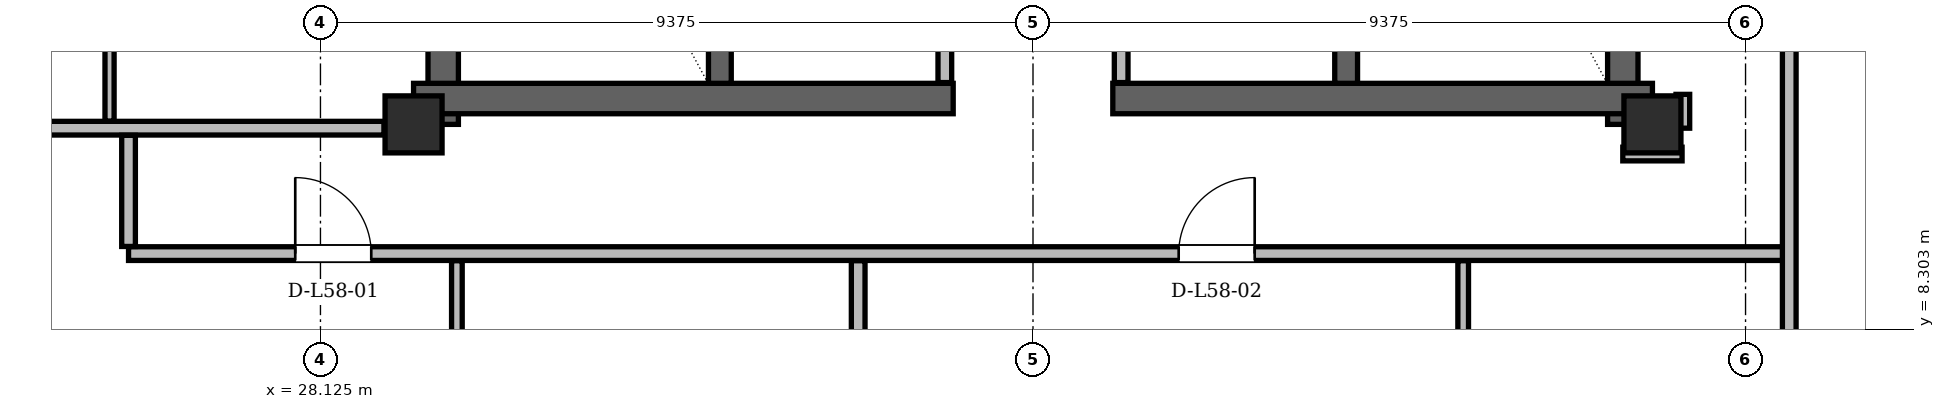
"""IFC4 building model, lengths in metres.
Left out: names, types, materials, properties, quantities, classifications, styles, units other than length and angle.
Written with IfcOpenShell. Run it as: python <this file> out.ifc"""

import sys

from ifc_helpers import new_model, si_unit, direction, frame, frame_2d, origin, origin_2d, place, context, subcontext, project, spatial, rectangle, hollow_rectangle, extrude, element, fill, save


model = new_model("IFC4")
c1 = context("Model", 3, precision=1e-05, world=origin(), true_north=direction((0.0, 1.0)))
c2 = subcontext(c1, "Body", "Model", "MODEL_VIEW")
j1 = project(units=[si_unit("LENGTHUNIT", "METRE"), si_unit("PLANEANGLEUNIT", "RADIAN")], contexts=[c1])
p1 = place(None, origin())
s1 = spatial("IfcSite", under=j1, at=p1, CompositionType="ELEMENT")
p2 = place(p1, origin())
s2 = spatial("IfcBuilding", under=s1, at=p2, CompositionType="ELEMENT")
p3 = place(p2, frame((0.0, 0.0, 219.9)))
s3 = spatial("IfcBuildingStorey", under=s2, at=p3, CompositionType="ELEMENT", Elevation=219.9)
for number, where, z_axis, x_axis in (
    (1, (29.35, 11.0, 0.0), (0.0, 0.0, 1.0), (1.0, 0.0, 0.0)),
    (2, (45.65, 11.0, 0.0), (0.0, 0.0, 1.0), (1.0, 0.0, 0.0)),
):
    element("IfcColumn", number, at=place(p3, frame(where, z_axis=z_axis, x_axis=x_axis)), inside=s3, PredefinedType="COLUMN", context=c2, shape_type="SweptSolid", body=[
        extrude(hollow_rectangle(XDim=0.75, YDim=0.75, WallThickness=0.06, at=origin_2d()), origin(), (0.0, 0.0, 1.0), 3.6),
    ])
for number, where, z_axis, x_axis in (
    (3, (29.74, 11.0, 0.0), (0.0, 0.0, 1.0), (0.0, 1.0, 0.0)),
    (4, (45.26, 11.0, 0.0), (0.0, 0.0, 1.0), (0.0, 1.0, 0.0)),
):
    element("IfcWall", number, at=place(p3, frame(where, z_axis=z_axis, x_axis=x_axis)), inside=s3, PredefinedType="SHEAR", context=c2, shape_type="SweptSolid", body=[
        extrude(rectangle(XDim=13.3, YDim=0.4, at=frame_2d((6.65, 0.0))), origin(), (0.0, 0.0, 1.0), 3.38),
    ])
for number, where, z_axis, x_axis in (
    (5, (29.35, 11.34, 0.0), (0.0, 0.0, 1.0), (1.0, 0.0, 0.0)),
    (6, (38.55, 11.34, 0.0), (0.0, 0.0, 1.0), (1.0, 0.0, 0.0)),
):
    element("IfcWall", number, at=place(p3, frame(where, z_axis=z_axis, x_axis=x_axis)), inside=s3, PredefinedType="SHEAR", context=c2, shape_type="SweptSolid", body=[
        extrude(rectangle(XDim=7.1, YDim=0.4, at=frame_2d((3.55, 0.0))), origin(), (0.0, 0.0, 1.0), 3.38),
    ])
for number, where, z_axis, x_axis in (
    (7, (33.38, 11.54, 0.0), (0.0, 0.0, 1.0), (0.0, 1.0, 0.0)),
    (8, (41.62, 11.54, 0.0), (0.0, 0.0, 1.0), (0.0, 1.0, 0.0)),
):
    element("IfcWall", number, at=place(p3, frame(where, z_axis=z_axis, x_axis=x_axis)), inside=s3, PredefinedType="SHEAR", context=c2, shape_type="SweptSolid", body=[
        extrude(rectangle(XDim=7.62, YDim=0.3, at=frame_2d((3.81, 0.0))), origin(), (0.0, 0.0, 1.0), 3.38),
    ])
p4 = place(p3, frame((59.113, 11.428, 0.0), z_axis=(0.0, 0.0, 1.0), x_axis=(-0.499994551211, 0.866028549621, 0.0)))
e9 = element("IfcWall", 9, at=p4, inside=s3, PredefinedType="SOLIDWALL", context=c2, shape_type="SweptSolid", body=[
    extrude(rectangle(XDim=36.634, YDim=0.29, at=frame_2d((18.317, 0.0))), origin(), (0.0, 0.0, 1.0), 2.677),
])
p5 = place(p4, frame((3.429, 0.0, 0.0)))
e10 = element("IfcOpeningElement", 10, at=p5, cuts=e9, PredefinedType="OPENING", context=c2, shape_type="SweptSolid", body=[
    extrude(rectangle(XDim=1.5, YDim=2.2, at=frame_2d((0.75, 1.1))), frame((0.0, 0.145, 0.0), z_axis=(0.0, -1.0, 0.0), x_axis=(1.0, 0.0, 0.0)), (0.0, 0.0, 1.0), 0.29),
])
p6 = place(p4, frame((27.099, 0.0, 0.0)))
e11 = element("IfcOpeningElement", 11, at=p6, cuts=e9, PredefinedType="OPENING", context=c2, shape_type="SweptSolid", body=[
    extrude(rectangle(XDim=1.5, YDim=2.2, at=frame_2d((0.75, 1.1))), frame((0.0, 0.145, 0.0), z_axis=(0.0, -1.0, 0.0), x_axis=(1.0, 0.0, 0.0)), (0.0, 0.0, 1.0), 0.29),
])
p7 = place(p4, frame((7.895, 0.0, 0.85)))
e12 = element("IfcOpeningElement", 12, at=p7, cuts=e9, PredefinedType="OPENING", context=c2, shape_type="SweptSolid", body=[
    extrude(rectangle(XDim=1.2, YDim=1.48, at=frame_2d((0.6, 0.74))), frame((0.0, 0.145, 0.0), z_axis=(0.0, -1.0, 0.0), x_axis=(1.0, 0.0, 0.0)), (0.0, 0.0, 1.0), 0.29),
])
p8 = place(p4, frame((1.262, 0.0, 0.85)))
e13 = element("IfcOpeningElement", 13, at=p8, cuts=e9, PredefinedType="OPENING", context=c2, shape_type="SweptSolid", body=[
    extrude(rectangle(XDim=1.2, YDim=1.48, at=frame_2d((0.6, 0.74))), frame((0.0, 0.145, 0.0), z_axis=(0.0, -1.0, 0.0), x_axis=(1.0, 0.0, 0.0)), (0.0, 0.0, 1.0), 0.29),
])
p9 = place(p4, frame((12.216, 0.0, 0.85)))
e14 = element("IfcOpeningElement", 14, at=p9, cuts=e9, PredefinedType="OPENING", context=c2, shape_type="SweptSolid", body=[
    extrude(rectangle(XDim=2.0, YDim=1.717, at=frame_2d((1.0, 0.858))), frame((0.0, 0.145, 0.0), z_axis=(0.0, -1.0, 0.0), x_axis=(1.0, 0.0, 0.0)), (0.0, 0.0, 1.0), 0.29),
])
p10 = place(p4, frame((17.285, 0.0, 0.85)))
e15 = element("IfcOpeningElement", 15, at=p10, cuts=e9, PredefinedType="OPENING", context=c2, shape_type="SweptSolid", body=[
    extrude(rectangle(XDim=1.4, YDim=1.6, at=frame_2d((0.7, 0.8))), frame((0.0, 0.145, 0.0), z_axis=(0.0, -1.0, 0.0), x_axis=(1.0, 0.0, 0.0)), (0.0, 0.0, 1.0), 0.29),
])
p11 = place(p4, frame((20.673, 0.0, 0.85)))
e16 = element("IfcOpeningElement", 16, at=p11, cuts=e9, PredefinedType="OPENING", context=c2, shape_type="SweptSolid", body=[
    extrude(rectangle(XDim=1.2, YDim=1.48, at=frame_2d((0.6, 0.74))), frame((0.0, 0.145, 0.0), z_axis=(0.0, -1.0, 0.0), x_axis=(1.0, 0.0, 0.0)), (0.0, 0.0, 1.0), 0.29),
])
p12 = place(p4, frame((34.257, 0.0, 0.85)))
e17 = element("IfcOpeningElement", 17, at=p12, cuts=e9, PredefinedType="OPENING", context=c2, shape_type="SweptSolid", body=[
    extrude(rectangle(XDim=1.2, YDim=1.48, at=frame_2d((0.6, 0.74))), frame((0.0, 0.145, 0.0), z_axis=(0.0, -1.0, 0.0), x_axis=(1.0, 0.0, 0.0)), (0.0, 0.0, 1.0), 0.29),
])
p13 = place(p3, frame((34.203, 43.154, 0.0), z_axis=(0.0, 0.0, 1.0), x_axis=(-0.499994551211, -0.866028549621, 0.0)))
e18 = element("IfcWall", 18, at=p13, inside=s3, PredefinedType="SOLIDWALL", context=c2, shape_type="SweptSolid", body=[
    extrude(rectangle(XDim=36.634, YDim=0.29, at=frame_2d((18.317, 0.0))), origin(), (0.0, 0.0, 1.0), 2.677),
])
p14 = place(p13, frame((3.429, 0.0, 0.0)))
e19 = element("IfcOpeningElement", 19, at=p14, cuts=e18, PredefinedType="OPENING", context=c2, shape_type="SweptSolid", body=[
    extrude(rectangle(XDim=1.5, YDim=2.2, at=frame_2d((0.75, 1.1))), frame((0.0, 0.145, 0.0), z_axis=(0.0, -1.0, 0.0), x_axis=(1.0, 0.0, 0.0)), (0.0, 0.0, 1.0), 0.29),
])
p15 = place(p13, frame((27.099, 0.0, 0.0)))
e20 = element("IfcOpeningElement", 20, at=p15, cuts=e18, PredefinedType="OPENING", context=c2, shape_type="SweptSolid", body=[
    extrude(rectangle(XDim=1.5, YDim=2.2, at=frame_2d((0.75, 1.1))), frame((0.0, 0.145, 0.0), z_axis=(0.0, -1.0, 0.0), x_axis=(1.0, 0.0, 0.0)), (0.0, 0.0, 1.0), 0.29),
])
p16 = place(p13, frame((22.904, 0.0, 0.85)))
e21 = element("IfcOpeningElement", 21, at=p16, cuts=e18, PredefinedType="OPENING", context=c2, shape_type="SweptSolid", body=[
    extrude(rectangle(XDim=1.2, YDim=1.48, at=frame_2d((0.6, 0.74))), frame((0.0, 0.145, 0.0), z_axis=(0.0, -1.0, 0.0), x_axis=(1.0, 0.0, 0.0)), (0.0, 0.0, 1.0), 0.29),
])
p17 = place(p13, frame((33.102, 0.0, 0.85)))
e22 = element("IfcOpeningElement", 22, at=p17, cuts=e18, PredefinedType="OPENING", context=c2, shape_type="SweptSolid", body=[
    extrude(rectangle(XDim=1.2, YDim=1.48, at=frame_2d((0.6, 0.74))), frame((0.0, 0.145, 0.0), z_axis=(0.0, -1.0, 0.0), x_axis=(1.0, 0.0, 0.0)), (0.0, 0.0, 1.0), 0.29),
])
p18 = place(p13, frame((8.475, 0.0, 0.85)))
e23 = element("IfcOpeningElement", 23, at=p18, cuts=e18, PredefinedType="OPENING", context=c2, shape_type="SweptSolid", body=[
    extrude(rectangle(XDim=1.2, YDim=1.48, at=frame_2d((0.6, 0.74))), frame((0.0, 0.145, 0.0), z_axis=(0.0, -1.0, 0.0), x_axis=(1.0, 0.0, 0.0)), (0.0, 0.0, 1.0), 0.29),
])
p19 = place(p13, frame((15.529, 0.0, 0.85)))
e24 = element("IfcOpeningElement", 24, at=p19, cuts=e18, PredefinedType="OPENING", context=c2, shape_type="SweptSolid", body=[
    extrude(rectangle(XDim=2.8, YDim=1.717, at=frame_2d((1.4, 0.858))), frame((0.0, 0.145, 0.0), z_axis=(0.0, -1.0, 0.0), x_axis=(1.0, 0.0, 0.0)), (0.0, 0.0, 1.0), 0.29),
])
p20 = place(p13, frame((1.5, 0.0, 0.85)))
e25 = element("IfcOpeningElement", 25, at=p20, cuts=e18, PredefinedType="OPENING", context=c2, shape_type="SweptSolid", body=[
    extrude(rectangle(XDim=1.2, YDim=1.48, at=frame_2d((0.6, 0.74))), frame((0.0, 0.145, 0.0), z_axis=(0.0, -1.0, 0.0), x_axis=(1.0, 0.0, 0.0)), (0.0, 0.0, 1.0), 0.29),
])
p21 = place(p3, frame((36.34, 11.55, 0.0), z_axis=(0.0, 0.0, 1.0), x_axis=(0.0, 1.0, 0.0)))
e26 = element("IfcWall", 26, at=p21, inside=s3, PredefinedType="PARTITIONING", context=c2, shape_type="SweptSolid", body=[
    extrude(rectangle(XDim=5.55, YDim=0.18, at=frame_2d((2.775, 0.0))), origin(), (0.0, 0.0, 1.0), 3.38),
])
p22 = place(p21, frame((2.85, 0.0, 0.0)))
e27 = element("IfcOpeningElement", 27, at=p22, cuts=e26, PredefinedType="OPENING", context=c2, shape_type="SweptSolid", body=[
    extrude(rectangle(XDim=0.95, YDim=2.1, at=frame_2d((0.475, 1.05))), frame((0.0, 0.09, 0.0), z_axis=(0.0, -1.0, 0.0), x_axis=(1.0, 0.0, 0.0)), (0.0, 0.0, 1.0), 0.18),
])
p23 = place(p3, frame((38.66, 11.55, 0.0), z_axis=(0.0, 0.0, 1.0), x_axis=(0.0, 1.0, 0.0)))
e28 = element("IfcWall", 28, at=p23, inside=s3, PredefinedType="PARTITIONING", context=c2, shape_type="SweptSolid", body=[
    extrude(rectangle(XDim=5.55, YDim=0.18, at=frame_2d((2.775, 0.0))), origin(), (0.0, 0.0, 1.0), 3.38),
])
p24 = place(p23, frame((3.15, 0.0, 0.0)))
e29 = element("IfcOpeningElement", 29, at=p24, cuts=e28, PredefinedType="OPENING", context=c2, shape_type="SweptSolid", body=[
    extrude(rectangle(XDim=0.95, YDim=2.1, at=frame_2d((0.475, 1.05))), frame((0.0, 0.09, 0.0), z_axis=(0.0, -1.0, 0.0), x_axis=(1.0, 0.0, 0.0)), (0.0, 0.0, 1.0), 0.18),
])
p25 = place(p3, frame((25.6, 9.3, 0.0), z_axis=(0.0, 0.0, 1.0), x_axis=(1.0, 0.0, 0.0)))
e30 = element("IfcWall", 30, at=p25, inside=s3, PredefinedType="PARTITIONING", context=c2, shape_type="SweptSolid", body=[
    extrude(rectangle(XDim=21.85, YDim=0.18, at=frame_2d((10.925, 0.0))), origin(), (0.0, 0.0, 1.0), 2.913),
])
p26 = place(p25, frame((2.193, 0.0, 0.0)))
e31 = element("IfcOpeningElement", 31, at=p26, cuts=e30, PredefinedType="OPENING", context=c2, shape_type="SweptSolid", body=[
    extrude(rectangle(XDim=1.0, YDim=2.18, at=frame_2d((0.5, 1.09))), frame((0.0, 0.09, 0.0), z_axis=(0.0, -1.0, 0.0), x_axis=(1.0, 0.0, 0.0)), (0.0, 0.0, 1.0), 0.18),
])
p27 = place(p25, frame((13.817, 0.0, 0.0)))
e32 = element("IfcOpeningElement", 32, at=p27, cuts=e30, PredefinedType="OPENING", context=c2, shape_type="SweptSolid", body=[
    extrude(rectangle(XDim=1.0, YDim=2.18, at=frame_2d((0.5, 1.09))), frame((0.0, 0.09, 0.0), z_axis=(0.0, -1.0, 0.0), x_axis=(1.0, 0.0, 0.0)), (0.0, 0.0, 1.0), 0.18),
])
p28 = place(p3, frame((45.26, 10.61, 0.0), z_axis=(0.0, 0.0, 1.0), x_axis=(1.0, 0.0, 0.0)))
e33 = element("IfcWall", 33, at=p28, inside=s3, PredefinedType="PARTITIONING", context=c2, shape_type="SweptSolid", body=[
    extrude(rectangle(XDim=0.78, YDim=0.18, at=frame_2d((0.39, 0.0))), origin(), (0.0, 0.0, 1.0), 3.38),
])
p29 = place(p3, frame((16.335, 10.95, 0.0), z_axis=(0.0, 0.0, 1.0), x_axis=(1.0, 0.0, 0.0)))
e34 = element("IfcWall", 34, at=p29, inside=s3, PredefinedType="PARTITIONING", context=c2, shape_type="SweptSolid", body=[
    extrude(rectangle(XDim=12.625, YDim=0.18, at=frame_2d((6.312, 0.0))), origin(), (0.0, 0.0, 1.0), 2.913),
])
p30 = place(p3, frame((25.35, 11.044, 0.0), z_axis=(0.0, 0.0, 1.0), x_axis=(0.0, 1.0, 0.0)))
e35 = element("IfcWall", 35, at=p30, inside=s3, PredefinedType="PARTITIONING", context=c2, shape_type="SweptSolid", body=[
    extrude(rectangle(XDim=3.592, YDim=0.12, at=frame_2d((1.796, 0.0))), origin(), (0.0, 0.0, 1.0), 3.38),
])
p31 = place(p3, frame((25.6, 9.394, 0.0), z_axis=(0.0, 0.0, 1.0), x_axis=(0.0, 1.0, 0.0)))
e36 = element("IfcWall", 36, at=p31, inside=s3, PredefinedType="PARTITIONING", context=c2, shape_type="SweptSolid", body=[
    extrude(rectangle(XDim=1.462, YDim=0.18, at=frame_2d((0.731, 0.0))), origin(), (0.0, 0.0, 1.0), 3.38),
])
p32 = place(p3, frame((29.92, 5.867, 0.0), z_axis=(0.0, 0.0, 1.0), x_axis=(0.0, 1.0, 0.0)))
e37 = element("IfcWall", 37, at=p32, inside=s3, PredefinedType="PARTITIONING", context=c2, shape_type="SweptSolid", body=[
    extrude(rectangle(XDim=3.339, YDim=0.14, at=frame_2d((1.669, 0.0))), origin(), (0.0, 0.0, 1.0), 3.38),
])
p33 = place(p32, frame((1.277, 0.0, 0.0)))
e38 = element("IfcOpeningElement", 38, at=p33, cuts=e37, PredefinedType="OPENING", context=c2, shape_type="SweptSolid", body=[
    extrude(rectangle(XDim=0.88, YDim=2.08, at=frame_2d((0.44, 1.04))), frame((0.0, 0.07, 0.0), z_axis=(0.0, -1.0, 0.0), x_axis=(1.0, 0.0, 0.0)), (0.0, 0.0, 1.0), 0.14),
])
p34 = place(p3, frame((35.2, 5.867, 0.0), z_axis=(0.0, 0.0, 1.0), x_axis=(0.0, 1.0, 0.0)))
e39 = element("IfcWall", 39, at=p34, inside=s3, PredefinedType="PARTITIONING", context=c2, shape_type="SweptSolid", body=[
    extrude(rectangle(XDim=3.339, YDim=0.18, at=frame_2d((1.669, 0.0))), origin(), (0.0, 0.0, 1.0), 3.38),
])
p35 = place(p3, frame((43.16, 5.867, 0.0), z_axis=(0.0, 0.0, 1.0), x_axis=(0.0, 1.0, 0.0)))
e40 = element("IfcWall", 40, at=p35, inside=s3, PredefinedType="PARTITIONING", context=c2, shape_type="SweptSolid", body=[
    extrude(rectangle(XDim=3.339, YDim=0.14, at=frame_2d((1.669, 0.0))), origin(), (0.0, 0.0, 1.0), 3.38),
])
p36 = place(p35, frame((1.277, 0.0, 0.0)))
e41 = element("IfcOpeningElement", 41, at=p36, cuts=e40, PredefinedType="OPENING", context=c2, shape_type="SweptSolid", body=[
    extrude(rectangle(XDim=0.88, YDim=2.08, at=frame_2d((0.44, 1.04))), frame((0.0, 0.07, 0.0), z_axis=(0.0, -1.0, 0.0), x_axis=(1.0, 0.0, 0.0)), (0.0, 0.0, 1.0), 0.14),
])
p37 = place(p3, frame((46.05, 10.95, 0.0), z_axis=(0.0, 0.0, 1.0), x_axis=(0.0, 1.0, 0.0)))
e42 = element("IfcWall", 42, at=p37, inside=s3, PredefinedType="PARTITIONING", context=c2, shape_type="SweptSolid", body=[
    extrude(rectangle(XDim=0.445, YDim=0.18, at=frame_2d((0.223, 0.0))), origin(), (0.0, 0.0, 1.0), 2.913),
])
p38 = place(p3, frame((47.45, 5.867, 0.0), z_axis=(0.0, 0.0, 1.0), x_axis=(0.0, 1.0, 0.0)))
e43 = element("IfcWall", 43, at=p38, inside=s3, PredefinedType="PARTITIONING", context=c2, shape_type="SweptSolid", body=[
    extrude(rectangle(XDim=25.465, YDim=0.18, at=frame_2d((12.732, 0.0))), origin(), (0.0, 0.0, 1.0), 2.913),
])
p39 = place(p38, frame((9.055, 0.0, 0.0)))
e44 = element("IfcOpeningElement", 44, at=p39, cuts=e43, PredefinedType="OPENING", context=c2, shape_type="SweptSolid", body=[
    extrude(rectangle(XDim=1.0, YDim=2.18, at=frame_2d((0.5, 1.09))), frame((0.0, 0.09, 0.0), z_axis=(0.0, -1.0, 0.0), x_axis=(1.0, 0.0, 0.0)), (0.0, 0.0, 1.0), 0.18),
])
p40 = place(p38, frame((15.845, 0.0, 0.0)))
e45 = element("IfcOpeningElement", 45, at=p40, cuts=e43, PredefinedType="OPENING", context=c2, shape_type="SweptSolid", body=[
    extrude(rectangle(XDim=1.0, YDim=2.18, at=frame_2d((0.5, 1.09))), frame((0.0, 0.09, 0.0), z_axis=(0.0, -1.0, 0.0), x_axis=(1.0, 0.0, 0.0)), (0.0, 0.0, 1.0), 0.18),
])
p41 = place(p26, origin())
e46 = element("IfcDoor", 46, at=p41, inside=s3, OperationType="SINGLE_SWING_LEFT", PredefinedType="DOOR", context=c2, shape_type="SweptSolid", body=[
    extrude(rectangle(XDim=1.0, YDim=2.18, at=frame_2d((0.5, 1.09))), frame((0.0, 0.025, 0.0), z_axis=(0.0, -1.0, 0.0), x_axis=(1.0, 0.0, 0.0)), (0.0, 0.0, 1.0), 0.05),
])
fill(e31, e46)
p42 = place(p27, origin())
e47 = element("IfcDoor", 47, at=p42, inside=s3, OperationType="SINGLE_SWING_RIGHT", PredefinedType="DOOR", context=c2, shape_type="SweptSolid", body=[
    extrude(rectangle(XDim=1.0, YDim=2.18, at=frame_2d((0.5, 1.09))), frame((0.0, 0.025, 0.0), z_axis=(0.0, -1.0, 0.0), x_axis=(1.0, 0.0, 0.0)), (0.0, 0.0, 1.0), 0.05),
])
fill(e32, e47)
save(model, sys.argv[1])
